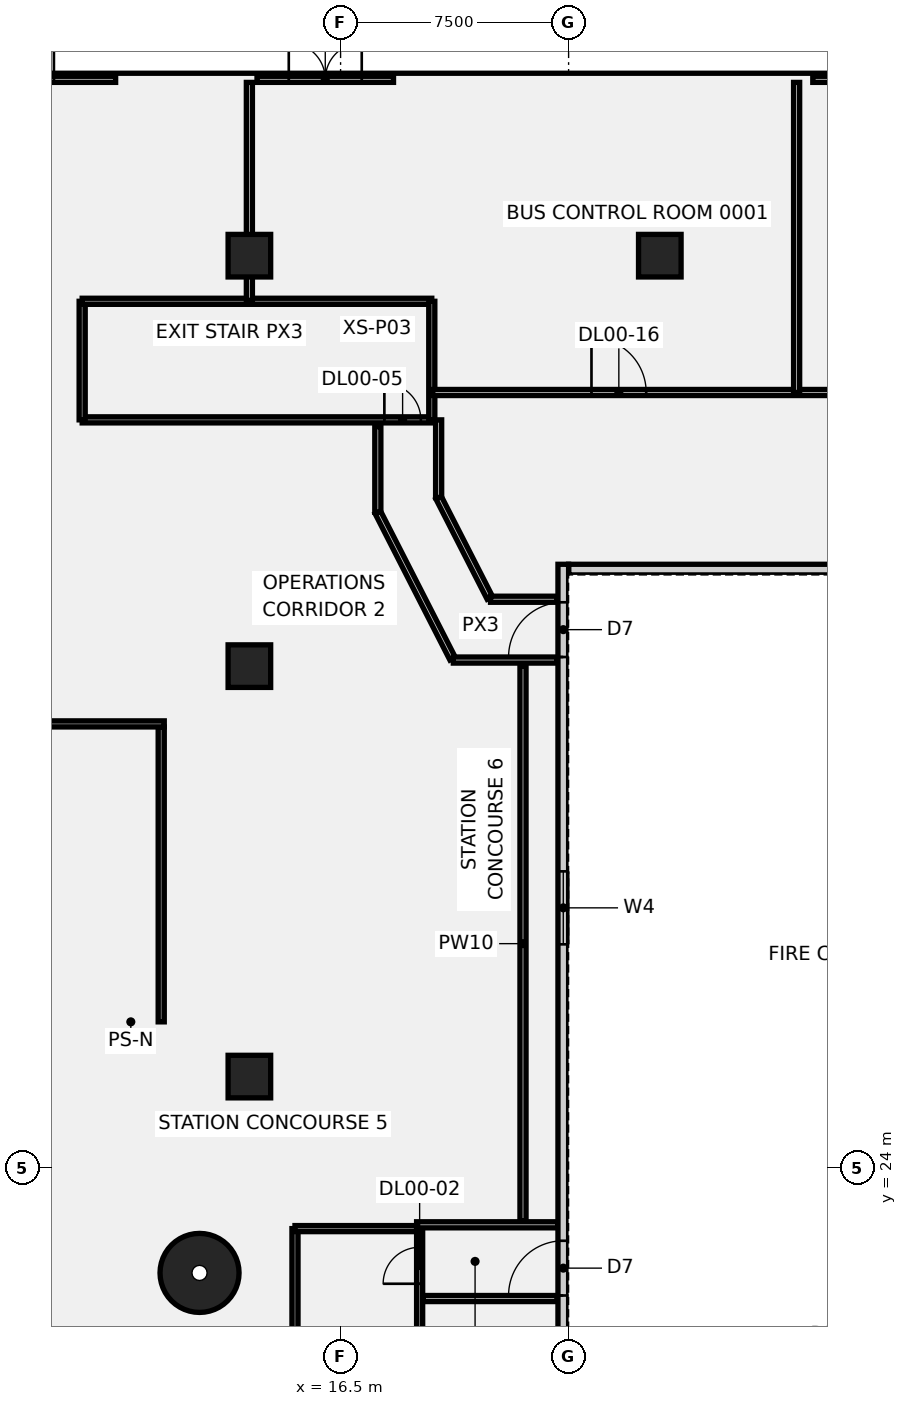
"""IFC4 building model, lengths in metres.
Left out: names, types, materials, properties, quantities, classifications, styles, units other than length and angle.
Written with IfcOpenShell. Run it as: python <this file> out.ifc"""

import sys

from ifc_helpers import new_model, si_unit, direction, frame, frame_2d, origin, origin_2d, place, context, subcontext, project, spatial, rectangle, circle, extrude, element, fill, save


model = new_model("IFC4")
c1 = context("Model", 3, precision=1e-05, world=origin(), true_north=direction((0.0, 1.0)))
c2 = subcontext(c1, "Body", "Model", "MODEL_VIEW")
j1 = project(units=[si_unit("LENGTHUNIT", "METRE"), si_unit("PLANEANGLEUNIT", "RADIAN")], contexts=[c1])
p1 = place(None, origin())
s1 = spatial("IfcSite", under=j1, at=p1, CompositionType="ELEMENT")
p2 = place(p1, origin())
s2 = spatial("IfcBuilding", under=s1, at=p2, CompositionType="ELEMENT")
p3 = place(p2, origin())
s3 = spatial("IfcBuildingStorey", under=s2, at=p3, CompositionType="ELEMENT", Elevation=0.0)
p4 = place(p3, frame((11.86, 20.543, -0.55), z_axis=(0.0, 0.0, 1.0), x_axis=(1.0, 0.0, 0.0)))
e1 = element("IfcColumn", 1, at=p4, inside=s3, PredefinedType="COLUMN", context=c2, shape_type="SweptSolid", body=[
    extrude(circle(Radius=1.3, at=origin_2d()), origin(), (0.0, 0.0, 1.0), 9.05),
])
for number, where, z_axis, x_axis in (
    (2, (13.5, 27.0, -0.55), (0.0, 0.0, 1.0), (1.0, 0.0, 0.0)),
    (3, (13.5, 40.5, -0.55), (0.0, 0.0, 1.0), (1.0, 0.0, 0.0)),
    (4, (13.5, 54.0, -0.55), (0.0, 0.0, 1.0), (1.0, 0.0, 0.0)),
    (5, (27.0, 54.0, -0.55), (0.0, 0.0, 1.0), (1.0, 0.0, 0.0)),
):
    element("IfcColumn", number, at=place(p3, frame(where, z_axis=z_axis, x_axis=x_axis)), inside=s3, PredefinedType="COLUMN", context=c2, shape_type="SweptSolid", body=[
        extrude(rectangle(XDim=1.4, YDim=1.4, at=origin_2d()), origin(), (0.0, 0.0, 1.0), 9.05),
    ])
p5 = place(p3, frame((15.0, 10.3, 0.0), z_axis=(0.0, 0.0, 1.0), x_axis=(0.0, 1.0, 0.0)))
e6 = element("IfcWall", 6, at=p5, inside=s3, PredefinedType="PARTITIONING", context=c2, shape_type="SweptSolid", body=[
    extrude(rectangle(XDim=11.7, YDim=0.2, at=frame_2d((5.85, 0.0))), origin(), (0.0, 0.0, 1.0), 8.5),
])
p6 = place(p3, frame((15.0, 22.0, 0.0), z_axis=(0.0, 0.0, 1.0), x_axis=(1.0, 0.0, 0.0)))
e7 = element("IfcWall", 7, at=p6, inside=s3, PredefinedType="PARTITIONING", context=c2, shape_type="SweptSolid", body=[
    extrude(rectangle(XDim=4.1, YDim=0.2, at=frame_2d((2.05, 0.0))), origin(), (0.0, 0.0, 1.0), 8.5),
])
p7 = place(p3, frame((19.1, 10.3, 0.0), z_axis=(0.0, 0.0, 1.0), x_axis=(0.0, 1.0, 0.0)))
e8 = element("IfcWall", 8, at=p7, inside=s3, PredefinedType="PARTITIONING", context=c2, shape_type="SweptSolid", body=[
    extrude(rectangle(XDim=11.7, YDim=0.2, at=frame_2d((5.85, 0.0))), origin(), (0.0, 0.0, 1.0), 8.5),
])
p8 = place(p7, frame((9.886, 0.0, 0.0)))
e9 = element("IfcOpeningElement", 9, at=p8, cuts=e8, PredefinedType="OPENING", context=c2, shape_type="SweptSolid", body=[
    extrude(rectangle(XDim=1.2, YDim=2.1, at=frame_2d((0.6, 1.05))), frame((0.0, 0.11, 0.0), z_axis=(0.0, -1.0, 0.0), x_axis=(1.0, 0.0, 0.0)), (0.0, 0.0, 1.0), 0.22),
])
p9 = place(p3, frame((8.0, 48.6, 0.0), z_axis=(0.0, 0.0, 1.0), x_axis=(1.0, 0.0, 0.0)))
e10 = element("IfcWall", 10, at=p9, inside=s3, PredefinedType="PARTITIONING", context=c2, shape_type="SweptSolid", body=[
    extrude(rectangle(XDim=11.5, YDim=0.2, at=frame_2d((5.75, 0.0))), origin(), (0.0, 0.0, 1.0), 8.5),
])
p10 = place(p9, frame((9.94, 0.0, 0.0)))
e11 = element("IfcOpeningElement", 11, at=p10, cuts=e10, PredefinedType="OPENING", context=c2, shape_type="SweptSolid", body=[
    extrude(rectangle(XDim=1.2, YDim=2.1, at=frame_2d((0.6, 1.05))), frame((0.0, 0.11, 0.0), z_axis=(0.0, -1.0, 0.0), x_axis=(1.0, 0.0, 0.0)), (0.0, 0.0, 1.0), 0.22),
])
p11 = place(p3, frame((8.0, 48.6, 0.0), z_axis=(0.0, 0.0, 1.0), x_axis=(0.0, 1.0, 0.0)))
e12 = element("IfcWall", 12, at=p11, inside=s3, PredefinedType="PARTITIONING", context=c2, shape_type="SweptSolid", body=[
    extrude(rectangle(XDim=3.9, YDim=0.2, at=frame_2d((1.95, 0.0))), origin(), (0.0, 0.0, 1.0), 8.5),
])
p12 = place(p3, frame((8.0, 52.5, 0.0), z_axis=(0.0, 0.0, 1.0), x_axis=(1.0, 0.0, 0.0)))
e13 = element("IfcWall", 13, at=p12, inside=s3, PredefinedType="PARTITIONING", context=c2, shape_type="SweptSolid", body=[
    extrude(rectangle(XDim=11.5, YDim=0.2, at=frame_2d((5.75, 0.0))), origin(), (0.0, 0.0, 1.0), 8.5),
])
p13 = place(p3, frame((19.5, 48.6, 0.0), z_axis=(0.0, 0.0, 1.0), x_axis=(0.0, 1.0, 0.0)))
e14 = element("IfcWall", 14, at=p13, inside=s3, PredefinedType="PARTITIONING", context=c2, shape_type="SweptSolid", body=[
    extrude(rectangle(XDim=3.9, YDim=0.2, at=frame_2d((1.95, 0.0))), origin(), (0.0, 0.0, 1.0), 8.5),
])
p14 = place(p3, frame((13.5, 52.53, 0.0), z_axis=(0.0, 0.0, 1.0), x_axis=(0.0, 1.0, 0.0)))
e15 = element("IfcWall", 15, at=p14, inside=s3, PredefinedType="PARTITIONING", context=c2, shape_type="SweptSolid", body=[
    extrude(rectangle(XDim=7.169, YDim=0.2, at=frame_2d((3.584, 0.0))), origin(), (0.0, 0.0, 1.0), 8.5),
])
p15 = place(p3, frame((19.53, 49.5, 0.0), z_axis=(0.0, 0.0, 1.0), x_axis=(1.0, 0.0, 0.0)))
e16 = element("IfcWall", 16, at=p15, inside=s3, PredefinedType="PARTITIONING", context=c2, shape_type="SweptSolid", body=[
    extrude(rectangle(XDim=28.44, YDim=0.2, at=frame_2d((14.22, 0.0))), origin(), (0.0, 0.0, 1.0), 8.5),
])
p16 = place(p15, frame((5.222, 0.0, 0.0)))
e17 = element("IfcOpeningElement", 17, at=p16, cuts=e16, PredefinedType="OPENING", context=c2, shape_type="SweptSolid", body=[
    extrude(rectangle(XDim=1.8, YDim=2.1, at=frame_2d((0.9, 1.05))), frame((0.0, 0.11, 0.0), z_axis=(0.0, -1.0, 0.0), x_axis=(1.0, 0.0, 0.0)), (0.0, 0.0, 1.0), 0.22),
])
p17 = place(p15, frame((19.32, 0.0, 0.0)))
e18 = element("IfcOpeningElement", 18, at=p17, cuts=e16, PredefinedType="OPENING", context=c2, shape_type="SweptSolid", body=[
    extrude(rectangle(XDim=1.8, YDim=2.1, at=frame_2d((0.9, 1.05))), frame((0.0, 0.11, 0.0), z_axis=(0.0, -1.0, 0.0), x_axis=(1.0, 0.0, 0.0)), (0.0, 0.0, 1.0), 0.22),
])
p18 = place(p3, frame((31.5, 49.5, 0.0), z_axis=(0.0, 0.0, 1.0), x_axis=(0.0, 1.0, 0.0)))
e19 = element("IfcWall", 19, at=p18, inside=s3, PredefinedType="PARTITIONING", context=c2, shape_type="SweptSolid", body=[
    extrude(rectangle(XDim=10.199, YDim=0.2, at=frame_2d((5.1, 0.0))), origin(), (0.0, 0.0, 1.0), 8.5),
])
p19 = place(p3, frame((22.5, 22.245, 0.0), z_axis=(0.0, 0.0, 1.0), x_axis=(0.0, 1.0, 0.0)))
e20 = element("IfcWall", 20, at=p19, inside=s3, PredefinedType="PARTITIONING", context=c2, shape_type="SweptSolid", body=[
    extrude(rectangle(XDim=18.255, YDim=0.2, at=frame_2d((9.127, 0.0))), origin(), (0.0, 0.0, 1.0), 8.5),
])
p20 = place(p3, frame((19.0, 22.125, 0.0), z_axis=(0.0, 0.0, 1.0), x_axis=(1.0, 0.0, 0.0)))
e21 = element("IfcWall", 21, at=p20, inside=s3, PredefinedType="PARTITIONING", context=c2, shape_type="SweptSolid", body=[
    extrude(rectangle(XDim=4.65, YDim=0.2, at=frame_2d((2.325, 0.0))), origin(), (0.0, 0.0, 1.0), 8.5),
])
p21 = place(p3, frame((19.22, 19.7, 0.0), z_axis=(0.0, 0.0, 1.0), x_axis=(1.0, 0.0, 0.0)))
e22 = element("IfcWall", 22, at=p21, inside=s3, PredefinedType="PARTITIONING", context=c2, shape_type="SweptSolid", body=[
    extrude(rectangle(XDim=4.4, YDim=0.2, at=frame_2d((2.2, 0.0))), origin(), (0.0, 0.0, 1.0), 8.5),
])
p22 = place(p3, frame((19.725, 48.6, 0.0), z_axis=(0.0, 0.0, 1.0), x_axis=(0.0, -1.0, 0.0)))
e23 = element("IfcWall", 23, at=p22, inside=s3, PredefinedType="PARTITIONING", context=c2, shape_type="SweptSolid", body=[
    extrude(rectangle(XDim=2.559, YDim=0.2, at=frame_2d((1.28, 0.0))), origin(), (0.0, 0.0, 1.0), 8.5),
])
p23 = place(p3, frame((19.725, 46.041, 0.0), z_axis=(0.0, 0.0, 1.0), x_axis=(0.454953010124, -0.890515445447, 0.0)))
e24 = element("IfcWall", 24, at=p23, inside=s3, PredefinedType="PARTITIONING", context=c2, shape_type="SweptSolid", body=[
    extrude(rectangle(XDim=3.702, YDim=0.2, at=frame_2d((1.851, 0.0))), origin(), (0.0, 0.0, 1.0), 8.5),
])
p24 = place(p3, frame((21.432, 42.7, 0.0), z_axis=(0.0, 0.0, 1.0), x_axis=(1.0, 0.0, 0.0)))
e25 = element("IfcWall", 25, at=p24, inside=s3, PredefinedType="PARTITIONING", context=c2, shape_type="SweptSolid", body=[
    extrude(rectangle(XDim=2.188, YDim=0.2, at=frame_2d((1.094, 0.0))), origin(), (0.0, 0.0, 1.0), 8.5),
])
p25 = place(p3, frame((17.725, 48.38, 0.0), z_axis=(0.0, 0.0, 1.0), x_axis=(0.0, -1.0, 0.0)))
e26 = element("IfcWall", 26, at=p25, inside=s3, PredefinedType="PARTITIONING", context=c2, shape_type="SweptSolid", body=[
    extrude(rectangle(XDim=2.821, YDim=0.2, at=frame_2d((1.41, 0.0))), origin(), (0.0, 0.0, 1.0), 8.5),
])
p26 = place(p3, frame((17.725, 45.559, 0.0), z_axis=(0.0, 0.0, 1.0), x_axis=(0.454998882798, -0.890492008191, 0.0)))
e27 = element("IfcWall", 27, at=p26, inside=s3, PredefinedType="PARTITIONING", context=c2, shape_type="SweptSolid", body=[
    extrude(rectangle(XDim=5.407, YDim=0.2, at=frame_2d((2.704, 0.0))), origin(), (0.0, 0.0, 1.0), 8.5),
])
p27 = place(p3, frame((20.208, 40.7, 0.0), z_axis=(0.0, 0.0, 1.0), x_axis=(1.0, 0.0, 0.0)))
e28 = element("IfcWall", 28, at=p27, inside=s3, PredefinedType="PARTITIONING", context=c2, shape_type="SweptSolid", body=[
    extrude(rectangle(XDim=3.412, YDim=0.2, at=frame_2d((1.706, 0.0))), origin(), (0.0, 0.0, 1.0), 8.5),
])
p28 = place(p3, frame((10.6, 28.8, 0.0), z_axis=(0.0, 0.0, 1.0), x_axis=(0.0, 1.0, 0.0)))
e29 = element("IfcWall", 29, at=p28, inside=s3, PredefinedType="SOLIDWALL", context=c2, shape_type="SweptSolid", body=[
    extrude(rectangle(XDim=9.7, YDim=0.2, at=frame_2d((4.85, 0.0))), origin(), (0.0, 0.0, 1.0), 8.5),
])
p29 = place(p3, frame((10.7, 38.6, 0.0), z_axis=(0.0, 0.0, 1.0), x_axis=(-1.0, 0.0, 0.0)))
e30 = element("IfcWall", 30, at=p29, inside=s3, PredefinedType="SOLIDWALL", context=c2, shape_type="SweptSolid", body=[
    extrude(rectangle(XDim=4.3, YDim=0.2, at=frame_2d((2.15, 0.0))), origin(), (0.0, 0.0, 1.0), 8.5),
])
p30 = place(p3, frame((36.522, 59.8, 0.0), z_axis=(0.0, 0.0, 1.0), x_axis=(-1.0, 0.0, 0.0)))
e31 = element("IfcWall", 31, at=p30, inside=s3, PredefinedType="SOLIDWALL", context=c2, shape_type="SweptSolid", body=[
    extrude(rectangle(XDim=4.49, YDim=0.2, at=frame_2d((2.245, 0.0))), origin(), (0.0, 0.0, 1.0), 2.9),
])
p31 = place(p30, frame((1.045, 0.0, 0.0)))
e32 = element("IfcOpeningElement", 32, at=p31, cuts=e31, PredefinedType="OPENING", context=c2, shape_type="SweptSolid", body=[
    extrude(rectangle(XDim=2.4, YDim=2.4, at=frame_2d((1.2, 1.2))), frame((0.0, 0.11, 0.0), z_axis=(0.0, -1.0, 0.0), x_axis=(1.0, 0.0, 0.0)), (0.0, 0.0, 1.0), 0.22),
])
p32 = place(p3, frame((18.241, 59.8, 0.0), z_axis=(0.0, 0.0, 1.0), x_axis=(-1.0, 0.0, 0.0)))
e33 = element("IfcWall", 33, at=p32, inside=s3, PredefinedType="SOLIDWALL", context=c2, shape_type="SweptSolid", body=[
    extrude(rectangle(XDim=4.49, YDim=0.2, at=frame_2d((2.245, 0.0))), origin(), (0.0, 0.0, 1.0), 2.9),
])
p33 = place(p32, frame((1.045, 0.0, 0.0)))
e34 = element("IfcOpeningElement", 34, at=p33, cuts=e33, PredefinedType="OPENING", context=c2, shape_type="SweptSolid", body=[
    extrude(rectangle(XDim=2.4, YDim=2.4, at=frame_2d((1.2, 1.2))), frame((0.0, 0.11, 0.0), z_axis=(0.0, -1.0, 0.0), x_axis=(1.0, 0.0, 0.0)), (0.0, 0.0, 1.0), 0.22),
])
p34 = place(p3, frame((9.101, 59.8, 0.0), z_axis=(0.0, 0.0, 1.0), x_axis=(-1.0, 0.0, 0.0)))
e35 = element("IfcWall", 35, at=p34, inside=s3, PredefinedType="SOLIDWALL", context=c2, shape_type="SweptSolid", body=[
    extrude(rectangle(XDim=9.061, YDim=0.2, at=frame_2d((4.53, 0.0))), origin(), (0.0, 0.0, 1.0), 2.9),
])
p35 = place(p34, frame((2.03, 0.0, 0.0)))
e36 = element("IfcOpeningElement", 36, at=p35, cuts=e35, PredefinedType="OPENING", context=c2, shape_type="SweptSolid", body=[
    extrude(rectangle(XDim=2.4, YDim=2.4, at=frame_2d((1.2, 1.2))), frame((0.0, 0.11, 0.0), z_axis=(0.0, -1.0, 0.0), x_axis=(1.0, 0.0, 0.0)), (0.0, 0.0, 1.0), 0.22),
])
p36 = place(p34, frame((4.63, 0.0, 0.0)))
e37 = element("IfcOpeningElement", 37, at=p36, cuts=e35, PredefinedType="OPENING", context=c2, shape_type="SweptSolid", body=[
    extrude(rectangle(XDim=2.4, YDim=2.4, at=frame_2d((1.2, 1.2))), frame((0.0, 0.11, 0.0), z_axis=(0.0, -1.0, 0.0), x_axis=(1.0, 0.0, 0.0)), (0.0, 0.0, 1.0), 0.22),
])
p37 = place(p3, frame((24.0, 43.675, 0.0), z_axis=(0.0, 0.0, 1.0), x_axis=(1.0, 0.0, 0.0)))
e38 = element("IfcWall", 38, at=p37, inside=s3, PredefinedType="SOLIDWALL", context=c2, shape_type="SweptSolid", body=[
    extrude(rectangle(XDim=18.0, YDim=0.35, at=frame_2d((9.0, 0.0))), origin(), (0.0, 0.0, 1.0), 8.5),
])
p38 = place(p3, frame((23.825, 16.45, 0.0), z_axis=(0.0, 0.0, 1.0), x_axis=(0.0, 1.0, 0.0)))
e39 = element("IfcWall", 39, at=p38, inside=s3, PredefinedType="SOLIDWALL", context=c2, shape_type="SweptSolid", body=[
    extrude(rectangle(XDim=27.4, YDim=0.35, at=frame_2d((13.7, 0.0))), origin(), (0.0, 0.0, 1.0), 8.5),
])
p39 = place(p38, frame((3.35, 0.0, 0.0)))
e40 = element("IfcOpeningElement", 40, at=p39, cuts=e39, PredefinedType="OPENING", context=c2, shape_type="SweptSolid", body=[
    extrude(rectangle(XDim=1.8, YDim=2.4, at=frame_2d((0.9, 1.2))), frame((0.0, 0.185, 0.0), z_axis=(0.0, -1.0, 0.0), x_axis=(1.0, 0.0, 0.0)), (0.0, 0.0, 1.0), 0.37),
])
p40 = place(p38, frame((24.35, 0.0, 0.0)))
e41 = element("IfcOpeningElement", 41, at=p40, cuts=e39, PredefinedType="OPENING", context=c2, shape_type="SweptSolid", body=[
    extrude(rectangle(XDim=1.8, YDim=2.4, at=frame_2d((0.9, 1.2))), frame((0.0, 0.185, 0.0), z_axis=(0.0, -1.0, 0.0), x_axis=(1.0, 0.0, 0.0)), (0.0, 0.0, 1.0), 0.37),
])
p41 = place(p38, frame((14.9, 0.0, 1.0)))
e42 = element("IfcOpeningElement", 42, at=p41, cuts=e39, PredefinedType="OPENING", context=c2, shape_type="SweptSolid", body=[
    extrude(rectangle(XDim=2.4, YDim=1.8, at=frame_2d((1.2, 0.9))), frame((0.0, 0.185, 0.0), z_axis=(0.0, -1.0, 0.0), x_axis=(1.0, 0.0, 0.0)), (0.0, 0.0, 1.0), 0.37),
])
p42 = place(p8, origin())
e43 = element("IfcDoor", 43, at=p42, inside=s3, OperationType="SINGLE_SWING_RIGHT", PredefinedType="DOOR", context=c2, shape_type="SweptSolid", body=[
    extrude(rectangle(XDim=1.2, YDim=2.1, at=frame_2d((0.6, 1.05))), frame((0.0, 0.025, 0.0), z_axis=(0.0, -1.0, 0.0), x_axis=(1.0, 0.0, 0.0)), (0.0, 0.0, 1.0), 0.05),
])
fill(e9, e43)
p43 = place(p10, origin())
e44 = element("IfcDoor", 44, at=p43, inside=s3, OperationType="SINGLE_SWING_LEFT", PredefinedType="DOOR", context=c2, shape_type="SweptSolid", body=[
    extrude(rectangle(XDim=1.2, YDim=2.1, at=frame_2d((0.6, 1.05))), frame((0.0, 0.025, 0.0), z_axis=(0.0, -1.0, 0.0), x_axis=(1.0, 0.0, 0.0)), (0.0, 0.0, 1.0), 0.05),
])
fill(e11, e44)
p44 = place(p16, origin())
e45 = element("IfcDoor", 45, at=p44, inside=s3, OperationType="SINGLE_SWING_RIGHT", PredefinedType="DOOR", context=c2, shape_type="SweptSolid", body=[
    extrude(rectangle(XDim=1.8, YDim=2.1, at=frame_2d((0.9, 1.05))), frame((0.0, 0.025, 0.0), z_axis=(0.0, -1.0, 0.0), x_axis=(1.0, 0.0, 0.0)), (0.0, 0.0, 1.0), 0.05),
])
fill(e17, e45)
p45 = place(p33, frame((2.4, 0.0, 0.0), z_axis=(0.0, 0.0, 1.0), x_axis=(-1.0, 0.0, 0.0)))
e46 = element("IfcDoor", 46, at=p45, inside=s3, OperationType="DOUBLE_DOOR_DOUBLE_SWING", PredefinedType="DOOR", context=c2, shape_type="SweptSolid", body=[
    extrude(rectangle(XDim=2.4, YDim=2.4, at=frame_2d((1.2, 1.2))), frame((0.0, 0.025, 0.0), z_axis=(0.0, -1.0, 0.0), x_axis=(1.0, 0.0, 0.0)), (0.0, 0.0, 1.0), 0.05),
])
fill(e34, e46)
p46 = place(p35, frame((2.4, 0.0, 0.0), z_axis=(0.0, 0.0, 1.0), x_axis=(-1.0, 0.0, 0.0)))
e47 = element("IfcDoor", 47, at=p46, inside=s3, OperationType="DOUBLE_DOOR_DOUBLE_SWING", PredefinedType="DOOR", context=c2, shape_type="SweptSolid", body=[
    extrude(rectangle(XDim=2.4, YDim=2.4, at=frame_2d((1.2, 1.2))), frame((0.0, 0.025, 0.0), z_axis=(0.0, -1.0, 0.0), x_axis=(1.0, 0.0, 0.0)), (0.0, 0.0, 1.0), 0.05),
])
fill(e36, e47)
p47 = place(p39, frame((1.8, 0.0, 0.0), z_axis=(0.0, 0.0, 1.0), x_axis=(-1.0, 0.0, 0.0)))
e48 = element("IfcDoor", 48, at=p47, inside=s3, OperationType="SINGLE_SWING_LEFT", PredefinedType="DOOR", context=c2, shape_type="SweptSolid", body=[
    extrude(rectangle(XDim=1.8, YDim=2.4, at=frame_2d((0.9, 1.2))), frame((0.0, 0.025, 0.0), z_axis=(0.0, -1.0, 0.0), x_axis=(1.0, 0.0, 0.0)), (0.0, 0.0, 1.0), 0.05),
])
fill(e40, e48)
p48 = place(p40, frame((1.8, 0.0, 0.0), z_axis=(0.0, 0.0, 1.0), x_axis=(-1.0, 0.0, 0.0)))
e49 = element("IfcDoor", 49, at=p48, inside=s3, OperationType="SINGLE_SWING_LEFT", PredefinedType="DOOR", context=c2, shape_type="SweptSolid", body=[
    extrude(rectangle(XDim=1.8, YDim=2.4, at=frame_2d((0.9, 1.2))), frame((0.0, 0.025, 0.0), z_axis=(0.0, -1.0, 0.0), x_axis=(1.0, 0.0, 0.0)), (0.0, 0.0, 1.0), 0.05),
])
fill(e41, e49)
p49 = place(p41, origin())
e50 = element("IfcWindow", 50, at=p49, inside=s3, PartitioningType="SINGLE_PANEL", PredefinedType="WINDOW", context=c2, shape_type="SweptSolid", body=[
    extrude(rectangle(XDim=2.4, YDim=1.8, at=frame_2d((1.2, 0.9))), frame((0.0, 0.03, 0.0), z_axis=(0.0, -1.0, 0.0), x_axis=(1.0, 0.0, 0.0)), (0.0, 0.0, 1.0), 0.06),
])
fill(e42, e50)
save(model, sys.argv[1])
